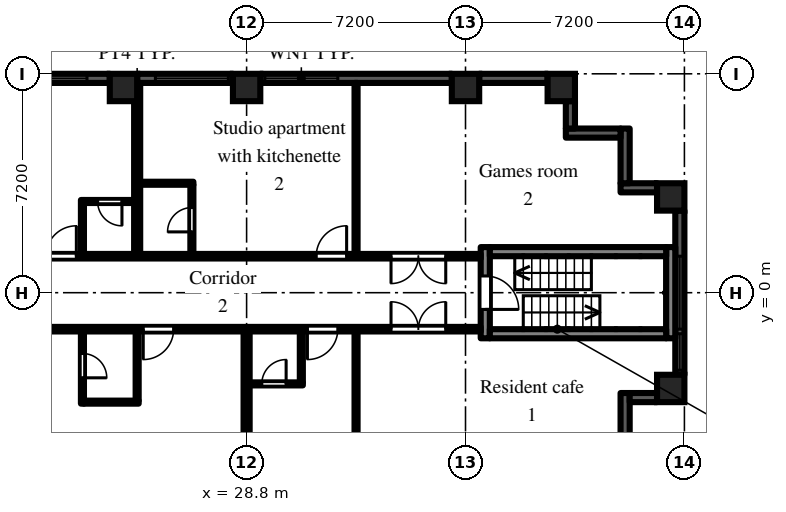
"""IFC4 building model, lengths in metres.
Left out: names, types, materials, properties, quantities, classifications, styles, units other than length and angle.
Written with IfcOpenShell. Run it as: python <this file> out.ifc"""

import sys

from ifc_helpers import new_model, si_unit, direction, frame, frame_2d, origin, origin_2d, place, context, subcontext, project, spatial, rectangle, extrude, element, fill, save


model = new_model("IFC4")
c1 = context("Model", 3, precision=1e-05, world=origin(), true_north=direction((0.0, 1.0)))
c2 = subcontext(c1, "Body", "Model", "MODEL_VIEW")
j1 = project(units=[si_unit("LENGTHUNIT", "METRE"), si_unit("PLANEANGLEUNIT", "RADIAN")], contexts=[c1])
p1 = place(None, origin())
s1 = spatial("IfcSite", under=j1, at=p1, CompositionType="ELEMENT")
p2 = place(p1, origin())
s2 = spatial("IfcBuilding", under=s1, at=p2, CompositionType="ELEMENT")
p3 = place(p2, frame((0.0, 0.0, 35.7)))
s3 = spatial("IfcBuildingStorey", under=s2, at=p3, CompositionType="ELEMENT", Elevation=35.7)
for number, where, z_axis, x_axis in (
    (1, (24.75, 6.75, 0.0), (0.0, 0.0, 1.0), (1.0, 0.0, 0.0)),
    (2, (28.8, 6.75, 0.0), (0.0, 0.0, 1.0), (1.0, 0.0, 0.0)),
    (3, (36.0, 6.75, 0.0), (0.0, 0.0, 1.0), (1.0, 0.0, 0.0)),
    (4, (39.15, 6.75, 0.0), (0.0, 0.0, 1.0), (1.0, 0.0, 0.0)),
    (5, (42.75, -3.15, 0.0), (0.0, 0.0, 1.0), (1.0, 0.0, 0.0)),
    (6, (42.75, 3.15, 0.0), (0.0, 0.0, 1.0), (1.0, 0.0, 0.0)),
):
    element("IfcColumn", number, at=place(p3, frame(where, z_axis=z_axis, x_axis=x_axis)), inside=s3, PredefinedType="COLUMN", context=c2, shape_type="SweptSolid", body=[
        extrude(rectangle(XDim=0.9, YDim=0.9, at=origin_2d()), origin(), (0.0, 0.0, 1.0), 3.0),
    ])
p4 = place(p3, frame((41.25, -5.1, 0.0), z_axis=(0.0, 0.0, 1.0), x_axis=(0.0, 1.0, 0.0)))
e7 = element("IfcWall", 7, at=p4, inside=s3, PredefinedType="SOLIDWALL", context=c2, shape_type="SweptSolid", body=[
    extrude(rectangle(XDim=1.8, YDim=0.3, at=frame_2d((0.9, 0.0))), origin(), (0.0, 0.0, 1.0), 2.575),
])
p5 = place(p3, frame((41.4, -3.45, 0.0), z_axis=(0.0, 0.0, 1.0), x_axis=(1.0, 0.0, 0.0)))
e8 = element("IfcWall", 8, at=p5, inside=s3, PredefinedType="SOLIDWALL", context=c2, shape_type="SweptSolid", body=[
    extrude(rectangle(XDim=0.9, YDim=0.3, at=frame_2d((0.45, 0.0))), origin(), (0.0, 0.0, 1.0), 2.575),
])
p6 = place(p3, frame((43.05, -2.7, 0.0), z_axis=(0.0, 0.0, 1.0), x_axis=(0.0, 1.0, 0.0)))
e9 = element("IfcWall", 9, at=p6, inside=s3, PredefinedType="SOLIDWALL", context=c2, shape_type="SweptSolid", body=[
    extrude(rectangle(XDim=5.4, YDim=0.3, at=frame_2d((2.7, 0.0))), origin(), (0.0, 0.0, 1.0), 2.1),
])
p7 = place(p6, frame((1.5, 0.0, 0.2)))
e10 = element("IfcOpeningElement", 10, at=p7, cuts=e9, PredefinedType="OPENING", context=c2, shape_type="SweptSolid", body=[
    extrude(rectangle(XDim=2.4, YDim=1.85, at=frame_2d((1.2, 0.925))), frame((0.0, 0.16, 0.0), z_axis=(0.0, -1.0, 0.0), x_axis=(1.0, 0.0, 0.0)), (0.0, 0.0, 1.0), 0.32),
])
p8 = place(p6, frame((0.15, 0.0, 0.2)))
e11 = element("IfcOpeningElement", 11, at=p8, cuts=e9, PredefinedType="OPENING", context=c2, shape_type="SweptSolid", body=[
    extrude(rectangle(XDim=1.2, YDim=1.85, at=frame_2d((0.6, 0.925))), frame((0.0, 0.16, 0.0), z_axis=(0.0, -1.0, 0.0), x_axis=(1.0, 0.0, 0.0)), (0.0, 0.0, 1.0), 0.32),
])
p9 = place(p3, frame((42.3, 3.45, 0.0), z_axis=(0.0, 0.0, 1.0), x_axis=(-1.0, 0.0, 0.0)))
e12 = element("IfcWall", 12, at=p9, inside=s3, PredefinedType="SOLIDWALL", context=c2, shape_type="SweptSolid", body=[
    extrude(rectangle(XDim=1.2, YDim=0.3, at=frame_2d((0.6, 0.0))), origin(), (0.0, 0.0, 1.0), 2.575),
])
p10 = place(p3, frame((41.25, 3.6, 0.0), z_axis=(0.0, 0.0, 1.0), x_axis=(0.0, 1.0, 0.0)))
e13 = element("IfcWall", 13, at=p10, inside=s3, PredefinedType="SOLIDWALL", context=c2, shape_type="SweptSolid", body=[
    extrude(rectangle(XDim=1.8, YDim=0.3, at=frame_2d((0.9, 0.0))), origin(), (0.0, 0.0, 1.0), 2.575),
])
p11 = place(p3, frame((41.1, 5.25, 0.0), z_axis=(0.0, 0.0, 1.0), x_axis=(-1.0, 0.0, 0.0)))
e14 = element("IfcWall", 14, at=p11, inside=s3, PredefinedType="SOLIDWALL", context=c2, shape_type="SweptSolid", body=[
    extrude(rectangle(XDim=1.8, YDim=0.3, at=frame_2d((0.9, 0.0))), origin(), (0.0, 0.0, 1.0), 2.575),
])
p12 = place(p3, frame((39.45, 5.4, 0.0), z_axis=(0.0, 0.0, 1.0), x_axis=(0.0, 1.0, 0.0)))
e15 = element("IfcWall", 15, at=p12, inside=s3, PredefinedType="SOLIDWALL", context=c2, shape_type="SweptSolid", body=[
    extrude(rectangle(XDim=0.9, YDim=0.3, at=frame_2d((0.45, 0.0))), origin(), (0.0, 0.0, 1.0), 2.575),
])
p13 = place(p3, frame((38.7, 7.05, 0.0), z_axis=(0.0, 0.0, 1.0), x_axis=(-1.0, 0.0, 0.0)))
e16 = element("IfcWall", 16, at=p13, inside=s3, PredefinedType="SOLIDWALL", context=c2, shape_type="SweptSolid", body=[
    extrude(rectangle(XDim=2.25, YDim=0.3, at=frame_2d((1.125, 0.0))), origin(), (0.0, 0.0, 1.0), 2.1),
])
p14 = place(p3, frame((35.55, 7.05, 0.0), z_axis=(0.0, 0.0, 1.0), x_axis=(-1.0, 0.0, 0.0)))
e17 = element("IfcWall", 17, at=p14, inside=s3, PredefinedType="SOLIDWALL", context=c2, shape_type="SweptSolid", body=[
    extrude(rectangle(XDim=6.3, YDim=0.3, at=frame_2d((3.15, 0.0))), origin(), (0.0, 0.0, 1.0), 2.1),
])
p15 = place(p14, frame((3.75, 0.0, 0.2)))
e18 = element("IfcOpeningElement", 18, at=p15, cuts=e17, PredefinedType="OPENING", context=c2, shape_type="SweptSolid", body=[
    extrude(rectangle(XDim=2.4, YDim=1.85, at=frame_2d((1.2, 0.925))), frame((0.0, 0.16, 0.0), z_axis=(0.0, -1.0, 0.0), x_axis=(1.0, 0.0, 0.0)), (0.0, 0.0, 1.0), 0.32),
])
p16 = place(p3, frame((28.35, 7.05, 0.0), z_axis=(0.0, 0.0, 1.0), x_axis=(-1.0, 0.0, 0.0)))
e19 = element("IfcWall", 19, at=p16, inside=s3, PredefinedType="SOLIDWALL", context=c2, shape_type="SweptSolid", body=[
    extrude(rectangle(XDim=3.15, YDim=0.3, at=frame_2d((1.575, 0.0))), origin(), (0.0, 0.0, 1.0), 2.1),
])
p17 = place(p16, frame((0.15, 0.0, 0.2)))
e20 = element("IfcOpeningElement", 20, at=p17, cuts=e19, PredefinedType="OPENING", context=c2, shape_type="SweptSolid", body=[
    extrude(rectangle(XDim=2.4, YDim=1.85, at=frame_2d((1.2, 0.925))), frame((0.0, 0.16, 0.0), z_axis=(0.0, -1.0, 0.0), x_axis=(1.0, 0.0, 0.0)), (0.0, 0.0, 1.0), 0.32),
])
p18 = place(p3, frame((24.3, 7.05, 0.0), z_axis=(0.0, 0.0, 1.0), x_axis=(-1.0, 0.0, 0.0)))
e21 = element("IfcWall", 21, at=p18, inside=s3, PredefinedType="SOLIDWALL", context=c2, shape_type="SweptSolid", body=[
    extrude(rectangle(XDim=2.7, YDim=0.3, at=frame_2d((1.35, 0.0))), origin(), (0.0, 0.0, 1.0), 2.1),
])
p19 = place(p18, frame((0.75, 0.0, 0.2)))
e22 = element("IfcOpeningElement", 22, at=p19, cuts=e21, PredefinedType="OPENING", context=c2, shape_type="SweptSolid", body=[
    extrude(rectangle(XDim=1.2, YDim=1.85, at=frame_2d((0.6, 0.925))), frame((0.0, 0.16, 0.0), z_axis=(0.0, -1.0, 0.0), x_axis=(1.0, 0.0, 0.0)), (0.0, 0.0, 1.0), 0.32),
])
p20 = place(p3, frame((36.65, -1.5, 0.0), z_axis=(0.0, 0.0, 1.0), x_axis=(0.0, 1.0, 0.0)))
e23 = element("IfcWall", 23, at=p20, inside=s3, PredefinedType="SHEAR", context=c2, shape_type="SweptSolid", body=[
    extrude(rectangle(XDim=3.0, YDim=0.3, at=frame_2d((1.5, 0.0))), origin(), (0.0, 0.0, 1.0), 2.575),
])
p21 = place(p20, frame((0.95, 0.0, 0.0)))
e24 = element("IfcOpeningElement", 24, at=p21, cuts=e23, PredefinedType="OPENING", context=c2, shape_type="SweptSolid", body=[
    extrude(rectangle(XDim=1.1, YDim=2.1, at=frame_2d((0.55, 1.05))), frame((0.0, 0.16, 0.0), z_axis=(0.0, -1.0, 0.0), x_axis=(1.0, 0.0, 0.0)), (0.0, 0.0, 1.0), 0.32),
])
p22 = place(p3, frame((42.75, -1.5, 0.0), z_axis=(0.0, 0.0, 1.0), x_axis=(0.0, 1.0, 0.0)))
e25 = element("IfcWall", 25, at=p22, inside=s3, PredefinedType="SHEAR", context=c2, shape_type="SweptSolid", body=[
    extrude(rectangle(XDim=3.0, YDim=0.3, at=frame_2d((1.5, 0.0))), origin(), (0.0, 0.0, 1.0), 2.575),
])
for number, where, z_axis, x_axis in (
    (26, (36.8, -1.35, 0.0), (0.0, 0.0, 1.0), (1.0, 0.0, 0.0)),
    (27, (36.8, 1.35, 0.0), (0.0, 0.0, 1.0), (1.0, 0.0, 0.0)),
):
    element("IfcWall", number, at=place(p3, frame(where, z_axis=z_axis, x_axis=x_axis)), inside=s3, PredefinedType="SHEAR", context=c2, shape_type="SweptSolid", body=[
        extrude(rectangle(XDim=5.8, YDim=0.3, at=frame_2d((2.9, 0.0))), origin(), (0.0, 0.0, 1.0), 2.575),
    ])
p23 = place(p3, frame((21.6, -1.2, 0.0), z_axis=(0.0, 0.0, 1.0), x_axis=(1.0, 0.0, 0.0)))
e28 = element("IfcWall", 28, at=p23, inside=s3, PredefinedType="PARTITIONING", context=c2, shape_type="SweptSolid", body=[
    extrude(rectangle(XDim=14.9, YDim=0.15, at=frame_2d((7.45, 0.0))), origin(), (0.0, 0.0, 1.0), 2.575),
])
p24 = place(p23, frame((3.8, 0.0, 0.0)))
e29 = element("IfcOpeningElement", 29, at=p24, cuts=e28, PredefinedType="OPENING", context=c2, shape_type="SweptSolid", body=[
    extrude(rectangle(XDim=1.0, YDim=2.1, at=frame_2d((0.5, 1.05))), frame((0.0, 0.085, 0.0), z_axis=(0.0, -1.0, 0.0), x_axis=(1.0, 0.0, 0.0)), (0.0, 0.0, 1.0), 0.17),
])
p25 = place(p23, frame((9.2, 0.0, 0.0)))
e30 = element("IfcOpeningElement", 30, at=p25, cuts=e28, PredefinedType="OPENING", context=c2, shape_type="SweptSolid", body=[
    extrude(rectangle(XDim=1.0, YDim=2.1, at=frame_2d((0.5, 1.05))), frame((0.0, 0.085, 0.0), z_axis=(0.0, -1.0, 0.0), x_axis=(1.0, 0.0, 0.0)), (0.0, 0.0, 1.0), 0.17),
])
p26 = place(p23, frame((11.95, 0.0, 0.0)))
e31 = element("IfcOpeningElement", 31, at=p26, cuts=e28, PredefinedType="OPENING", context=c2, shape_type="SweptSolid", body=[
    extrude(rectangle(XDim=1.8, YDim=2.1, at=frame_2d((0.9, 1.05))), frame((0.0, 0.085, 0.0), z_axis=(0.0, -1.0, 0.0), x_axis=(1.0, 0.0, 0.0)), (0.0, 0.0, 1.0), 0.17),
])
p27 = place(p3, frame((21.6, 1.2, 0.0), z_axis=(0.0, 0.0, 1.0), x_axis=(1.0, 0.0, 0.0)))
e32 = element("IfcWall", 32, at=p27, inside=s3, PredefinedType="PARTITIONING", context=c2, shape_type="SweptSolid", body=[
    extrude(rectangle(XDim=14.9, YDim=0.15, at=frame_2d((7.45, 0.0))), origin(), (0.0, 0.0, 1.0), 2.575),
])
p28 = place(p27, frame((0.6, 0.0, 0.0)))
e33 = element("IfcOpeningElement", 33, at=p28, cuts=e32, PredefinedType="OPENING", context=c2, shape_type="SweptSolid", body=[
    extrude(rectangle(XDim=1.0, YDim=2.1, at=frame_2d((0.5, 1.05))), frame((0.0, 0.085, 0.0), z_axis=(0.0, -1.0, 0.0), x_axis=(1.0, 0.0, 0.0)), (0.0, 0.0, 1.0), 0.17),
])
p29 = place(p27, frame((9.49, 0.0, 0.0)))
e34 = element("IfcOpeningElement", 34, at=p29, cuts=e32, PredefinedType="OPENING", context=c2, shape_type="SweptSolid", body=[
    extrude(rectangle(XDim=1.0, YDim=2.1, at=frame_2d((0.5, 1.05))), frame((0.0, 0.085, 0.0), z_axis=(0.0, -1.0, 0.0), x_axis=(1.0, 0.0, 0.0)), (0.0, 0.0, 1.0), 0.17),
])
p30 = place(p27, frame((11.95, 0.0, 0.0)))
e35 = element("IfcOpeningElement", 35, at=p30, cuts=e32, PredefinedType="OPENING", context=c2, shape_type="SweptSolid", body=[
    extrude(rectangle(XDim=1.8, YDim=2.1, at=frame_2d((0.9, 1.05))), frame((0.0, 0.085, 0.0), z_axis=(0.0, -1.0, 0.0), x_axis=(1.0, 0.0, 0.0)), (0.0, 0.0, 1.0), 0.17),
])
p31 = place(p3, frame((23.4, -3.65, 0.0), z_axis=(0.0, 0.0, 1.0), x_axis=(0.0, 1.0, 0.0)))
e36 = element("IfcWall", 36, at=p31, inside=s3, PredefinedType="PARTITIONING", context=c2, shape_type="SweptSolid", body=[
    extrude(rectangle(XDim=2.375, YDim=0.1, at=frame_2d((1.188, 0.0))), origin(), (0.0, 0.0, 1.0), 2.575),
])
p32 = place(p31, frame((0.85, 0.0, 0.0)))
e37 = element("IfcOpeningElement", 37, at=p32, cuts=e36, PredefinedType="OPENING", context=c2, shape_type="SweptSolid", body=[
    extrude(rectangle(XDim=0.8, YDim=2.1, at=frame_2d((0.4, 1.05))), frame((0.0, 0.06, 0.0), z_axis=(0.0, -1.0, 0.0), x_axis=(1.0, 0.0, 0.0)), (0.0, 0.0, 1.0), 0.12),
])
p33 = place(p3, frame((23.45, -3.6, 0.0), z_axis=(0.0, 0.0, 1.0), x_axis=(1.0, 0.0, 0.0)))
e38 = element("IfcWall", 38, at=p33, inside=s3, PredefinedType="PARTITIONING", context=c2, shape_type="SweptSolid", body=[
    extrude(rectangle(XDim=1.8, YDim=0.1, at=frame_2d((0.9, 0.0))), origin(), (0.0, 0.0, 1.0), 2.575),
])
p34 = place(p3, frame((23.4, 1.275, 0.0), z_axis=(0.0, 0.0, 1.0), x_axis=(0.0, 1.0, 0.0)))
e39 = element("IfcWall", 39, at=p34, inside=s3, PredefinedType="PARTITIONING", context=c2, shape_type="SweptSolid", body=[
    extrude(rectangle(XDim=1.775, YDim=0.1, at=frame_2d((0.888, 0.0))), origin(), (0.0, 0.0, 1.0), 2.575),
])
p35 = place(p3, frame((23.45, 3.0, 0.0), z_axis=(0.0, 0.0, 1.0), x_axis=(1.0, 0.0, 0.0)))
e40 = element("IfcWall", 40, at=p35, inside=s3, PredefinedType="PARTITIONING", context=c2, shape_type="SweptSolid", body=[
    extrude(rectangle(XDim=1.65, YDim=0.1, at=frame_2d((0.825, 0.0))), origin(), (0.0, 0.0, 1.0), 2.575),
])
p36 = place(p35, frame((0.45, 0.0, 0.0)))
e41 = element("IfcOpeningElement", 41, at=p36, cuts=e40, PredefinedType="OPENING", context=c2, shape_type="SweptSolid", body=[
    extrude(rectangle(XDim=0.8, YDim=2.1, at=frame_2d((0.4, 1.05))), frame((0.0, 0.06, 0.0), z_axis=(0.0, -1.0, 0.0), x_axis=(1.0, 0.0, 0.0)), (0.0, 0.0, 1.0), 0.12),
])
p37 = place(p3, frame((25.2, -3.55, 0.0), z_axis=(0.0, 0.0, 1.0), x_axis=(0.0, 1.0, 0.0)))
e42 = element("IfcWall", 42, at=p37, inside=s3, PredefinedType="PARTITIONING", context=c2, shape_type="SweptSolid", body=[
    extrude(rectangle(XDim=2.275, YDim=0.1, at=frame_2d((1.138, 0.0))), origin(), (0.0, 0.0, 1.0), 2.575),
])
p38 = place(p3, frame((25.2, 1.275, 0.0), z_axis=(0.0, 0.0, 1.0), x_axis=(0.0, 1.0, 0.0)))
e43 = element("IfcWall", 43, at=p38, inside=s3, PredefinedType="PARTITIONING", context=c2, shape_type="SweptSolid", body=[
    extrude(rectangle(XDim=5.625, YDim=0.2, at=frame_2d((2.812, 0.0))), origin(), (0.0, 0.0, 1.0), 2.575),
])
p39 = place(p3, frame((25.3, 3.6, 0.0), z_axis=(0.0, 0.0, 1.0), x_axis=(1.0, 0.0, 0.0)))
e44 = element("IfcWall", 44, at=p39, inside=s3, PredefinedType="PARTITIONING", context=c2, shape_type="SweptSolid", body=[
    extrude(rectangle(XDim=1.75, YDim=0.1, at=frame_2d((0.875, 0.0))), origin(), (0.0, 0.0, 1.0), 2.575),
])
p40 = place(p3, frame((27.0, 1.275, 0.0), z_axis=(0.0, 0.0, 1.0), x_axis=(0.0, 1.0, 0.0)))
e45 = element("IfcWall", 45, at=p40, inside=s3, PredefinedType="PARTITIONING", context=c2, shape_type="SweptSolid", body=[
    extrude(rectangle(XDim=2.275, YDim=0.1, at=frame_2d((1.138, 0.0))), origin(), (0.0, 0.0, 1.0), 2.575),
])
p41 = place(p40, frame((0.725, 0.0, 0.0)))
e46 = element("IfcOpeningElement", 46, at=p41, cuts=e45, PredefinedType="OPENING", context=c2, shape_type="SweptSolid", body=[
    extrude(rectangle(XDim=0.8, YDim=2.1, at=frame_2d((0.4, 1.05))), frame((0.0, 0.06, 0.0), z_axis=(0.0, -1.0, 0.0), x_axis=(1.0, 0.0, 0.0)), (0.0, 0.0, 1.0), 0.12),
])
p42 = place(p3, frame((28.8, -6.9, 0.0), z_axis=(0.0, 0.0, 1.0), x_axis=(0.0, 1.0, 0.0)))
e47 = element("IfcWall", 47, at=p42, inside=s3, PredefinedType="PARTITIONING", context=c2, shape_type="SweptSolid", body=[
    extrude(rectangle(XDim=5.625, YDim=0.2, at=frame_2d((2.812, 0.0))), origin(), (0.0, 0.0, 1.0), 2.575),
])
p43 = place(p3, frame((28.9, -3.0, 0.0), z_axis=(0.0, 0.0, 1.0), x_axis=(1.0, 0.0, 0.0)))
e48 = element("IfcWall", 48, at=p43, inside=s3, PredefinedType="PARTITIONING", context=c2, shape_type="SweptSolid", body=[
    extrude(rectangle(XDim=1.75, YDim=0.1, at=frame_2d((0.875, 0.0))), origin(), (0.0, 0.0, 1.0), 2.575),
])
p44 = place(p43, frame((0.4, 0.0, 0.0)))
e49 = element("IfcOpeningElement", 49, at=p44, cuts=e48, PredefinedType="OPENING", context=c2, shape_type="SweptSolid", body=[
    extrude(rectangle(XDim=0.8, YDim=2.1, at=frame_2d((0.4, 1.05))), frame((0.0, 0.06, 0.0), z_axis=(0.0, -1.0, 0.0), x_axis=(1.0, 0.0, 0.0)), (0.0, 0.0, 1.0), 0.12),
])
p45 = place(p3, frame((30.6, -2.95, 0.0), z_axis=(0.0, 0.0, 1.0), x_axis=(0.0, 1.0, 0.0)))
e50 = element("IfcWall", 50, at=p45, inside=s3, PredefinedType="PARTITIONING", context=c2, shape_type="SweptSolid", body=[
    extrude(rectangle(XDim=1.675, YDim=0.1, at=frame_2d((0.837, 0.0))), origin(), (0.0, 0.0, 1.0), 2.575),
])
for number, where, z_axis, x_axis in (
    (51, (32.4, -6.9, 0.0), (0.0, 0.0, 1.0), (0.0, 1.0, 0.0)),
    (52, (32.4, 1.275, 0.0), (0.0, 0.0, 1.0), (0.0, 1.0, 0.0)),
):
    element("IfcWall", number, at=place(p3, frame(where, z_axis=z_axis, x_axis=x_axis)), inside=s3, PredefinedType="PARTITIONING", context=c2, shape_type="SweptSolid", body=[
        extrude(rectangle(XDim=5.625, YDim=0.1, at=frame_2d((2.812, 0.0))), origin(), (0.0, 0.0, 1.0), 2.575),
    ])
p46 = place(p7, origin())
e53 = element("IfcWindow", 53, at=p46, inside=s3, PartitioningType="SINGLE_PANEL", PredefinedType="WINDOW", context=c2, shape_type="SweptSolid", body=[
    extrude(rectangle(XDim=2.4, YDim=1.85, at=frame_2d((1.2, 0.925))), frame((0.0, 0.03, 0.0), z_axis=(0.0, -1.0, 0.0), x_axis=(1.0, 0.0, 0.0)), (0.0, 0.0, 1.0), 0.06),
])
fill(e10, e53)
p47 = place(p8, origin())
e54 = element("IfcWindow", 54, at=p47, inside=s3, PartitioningType="SINGLE_PANEL", PredefinedType="WINDOW", context=c2, shape_type="SweptSolid", body=[
    extrude(rectangle(XDim=1.2, YDim=1.85, at=frame_2d((0.6, 0.925))), frame((0.0, 0.03, 0.0), z_axis=(0.0, -1.0, 0.0), x_axis=(1.0, 0.0, 0.0)), (0.0, 0.0, 1.0), 0.06),
])
fill(e11, e54)
p48 = place(p15, origin())
e55 = element("IfcWindow", 55, at=p48, inside=s3, PartitioningType="SINGLE_PANEL", PredefinedType="WINDOW", context=c2, shape_type="SweptSolid", body=[
    extrude(rectangle(XDim=2.4, YDim=1.85, at=frame_2d((1.2, 0.925))), frame((0.0, 0.03, 0.0), z_axis=(0.0, -1.0, 0.0), x_axis=(1.0, 0.0, 0.0)), (0.0, 0.0, 1.0), 0.06),
])
fill(e18, e55)
p49 = place(p17, origin())
e56 = element("IfcWindow", 56, at=p49, inside=s3, PartitioningType="SINGLE_PANEL", PredefinedType="WINDOW", context=c2, shape_type="SweptSolid", body=[
    extrude(rectangle(XDim=2.4, YDim=1.85, at=frame_2d((1.2, 0.925))), frame((0.0, 0.03, 0.0), z_axis=(0.0, -1.0, 0.0), x_axis=(1.0, 0.0, 0.0)), (0.0, 0.0, 1.0), 0.06),
])
fill(e20, e56)
p50 = place(p19, origin())
e57 = element("IfcWindow", 57, at=p50, inside=s3, PartitioningType="SINGLE_PANEL", PredefinedType="WINDOW", context=c2, shape_type="SweptSolid", body=[
    extrude(rectangle(XDim=1.2, YDim=1.85, at=frame_2d((0.6, 0.925))), frame((0.0, 0.03, 0.0), z_axis=(0.0, -1.0, 0.0), x_axis=(1.0, 0.0, 0.0)), (0.0, 0.0, 1.0), 0.06),
])
fill(e22, e57)
p51 = place(p21, frame((1.1, 0.0, 0.0), z_axis=(0.0, 0.0, 1.0), x_axis=(-1.0, 0.0, 0.0)))
e58 = element("IfcDoor", 58, at=p51, inside=s3, OperationType="SINGLE_SWING_RIGHT", PredefinedType="DOOR", context=c2, shape_type="SweptSolid", body=[
    extrude(rectangle(XDim=1.1, YDim=2.1, at=frame_2d((0.55, 1.05))), frame((0.0, 0.025, 0.0), z_axis=(0.0, -1.0, 0.0), x_axis=(1.0, 0.0, 0.0)), (0.0, 0.0, 1.0), 0.05),
])
fill(e24, e58)
p52 = place(p36, frame((0.8, 0.0, 0.0), z_axis=(0.0, 0.0, 1.0), x_axis=(-1.0, 0.0, 0.0)))
e59 = element("IfcDoor", 59, at=p52, inside=s3, OperationType="SINGLE_SWING_LEFT", PredefinedType="DOOR", context=c2, shape_type="SweptSolid", body=[
    extrude(rectangle(XDim=0.8, YDim=2.1, at=frame_2d((0.4, 1.05))), frame((0.0, 0.025, 0.0), z_axis=(0.0, -1.0, 0.0), x_axis=(1.0, 0.0, 0.0)), (0.0, 0.0, 1.0), 0.05),
])
fill(e41, e59)
p53 = place(p28, origin())
e60 = element("IfcDoor", 60, at=p53, inside=s3, OperationType="SINGLE_SWING_RIGHT", PredefinedType="DOOR", context=c2, shape_type="SweptSolid", body=[
    extrude(rectangle(XDim=1.0, YDim=2.1, at=frame_2d((0.5, 1.05))), frame((0.0, 0.025, 0.0), z_axis=(0.0, -1.0, 0.0), x_axis=(1.0, 0.0, 0.0)), (0.0, 0.0, 1.0), 0.05),
])
fill(e33, e60)
p54 = place(p41, origin())
e61 = element("IfcDoor", 61, at=p54, inside=s3, OperationType="SINGLE_SWING_LEFT", PredefinedType="DOOR", context=c2, shape_type="SweptSolid", body=[
    extrude(rectangle(XDim=0.8, YDim=2.1, at=frame_2d((0.4, 1.05))), frame((0.0, 0.025, 0.0), z_axis=(0.0, -1.0, 0.0), x_axis=(1.0, 0.0, 0.0)), (0.0, 0.0, 1.0), 0.05),
])
fill(e46, e61)
p55 = place(p29, origin())
e62 = element("IfcDoor", 62, at=p55, inside=s3, OperationType="SINGLE_SWING_RIGHT", PredefinedType="DOOR", context=c2, shape_type="SweptSolid", body=[
    extrude(rectangle(XDim=1.0, YDim=2.1, at=frame_2d((0.5, 1.05))), frame((0.0, 0.025, 0.0), z_axis=(0.0, -1.0, 0.0), x_axis=(1.0, 0.0, 0.0)), (0.0, 0.0, 1.0), 0.05),
])
fill(e34, e62)
p56 = place(p30, frame((1.8, 0.0, 0.0), z_axis=(0.0, 0.0, 1.0), x_axis=(-1.0, 0.0, 0.0)))
e63 = element("IfcDoor", 63, at=p56, inside=s3, OperationType="DOUBLE_DOOR_DOUBLE_SWING", PredefinedType="DOOR", context=c2, shape_type="SweptSolid", body=[
    extrude(rectangle(XDim=1.8, YDim=2.1, at=frame_2d((0.9, 1.05))), frame((0.0, 0.025, 0.0), z_axis=(0.0, -1.0, 0.0), x_axis=(1.0, 0.0, 0.0)), (0.0, 0.0, 1.0), 0.05),
])
fill(e35, e63)
p57 = place(p32, frame((0.8, 0.0, 0.0), z_axis=(0.0, 0.0, 1.0), x_axis=(-1.0, 0.0, 0.0)))
e64 = element("IfcDoor", 64, at=p57, inside=s3, OperationType="SINGLE_SWING_RIGHT", PredefinedType="DOOR", context=c2, shape_type="SweptSolid", body=[
    extrude(rectangle(XDim=0.8, YDim=2.1, at=frame_2d((0.4, 1.05))), frame((0.0, 0.025, 0.0), z_axis=(0.0, -1.0, 0.0), x_axis=(1.0, 0.0, 0.0)), (0.0, 0.0, 1.0), 0.05),
])
fill(e37, e64)
p58 = place(p24, frame((1.0, 0.0, 0.0), z_axis=(0.0, 0.0, 1.0), x_axis=(-1.0, 0.0, 0.0)))
e65 = element("IfcDoor", 65, at=p58, inside=s3, OperationType="SINGLE_SWING_RIGHT", PredefinedType="DOOR", context=c2, shape_type="SweptSolid", body=[
    extrude(rectangle(XDim=1.0, YDim=2.1, at=frame_2d((0.5, 1.05))), frame((0.0, 0.025, 0.0), z_axis=(0.0, -1.0, 0.0), x_axis=(1.0, 0.0, 0.0)), (0.0, 0.0, 1.0), 0.05),
])
fill(e29, e65)
p59 = place(p44, origin())
e66 = element("IfcDoor", 66, at=p59, inside=s3, OperationType="SINGLE_SWING_RIGHT", PredefinedType="DOOR", context=c2, shape_type="SweptSolid", body=[
    extrude(rectangle(XDim=0.8, YDim=2.1, at=frame_2d((0.4, 1.05))), frame((0.0, 0.025, 0.0), z_axis=(0.0, -1.0, 0.0), x_axis=(1.0, 0.0, 0.0)), (0.0, 0.0, 1.0), 0.05),
])
fill(e49, e66)
p60 = place(p25, frame((1.0, 0.0, 0.0), z_axis=(0.0, 0.0, 1.0), x_axis=(-1.0, 0.0, 0.0)))
e67 = element("IfcDoor", 67, at=p60, inside=s3, OperationType="SINGLE_SWING_RIGHT", PredefinedType="DOOR", context=c2, shape_type="SweptSolid", body=[
    extrude(rectangle(XDim=1.0, YDim=2.1, at=frame_2d((0.5, 1.05))), frame((0.0, 0.025, 0.0), z_axis=(0.0, -1.0, 0.0), x_axis=(1.0, 0.0, 0.0)), (0.0, 0.0, 1.0), 0.05),
])
fill(e30, e67)
p61 = place(p26, origin())
e68 = element("IfcDoor", 68, at=p61, inside=s3, OperationType="DOUBLE_DOOR_DOUBLE_SWING", PredefinedType="DOOR", context=c2, shape_type="SweptSolid", body=[
    extrude(rectangle(XDim=1.8, YDim=2.1, at=frame_2d((0.9, 1.05))), frame((0.0, 0.025, 0.0), z_axis=(0.0, -1.0, 0.0), x_axis=(1.0, 0.0, 0.0)), (0.0, 0.0, 1.0), 0.05),
])
fill(e31, e68)
save(model, sys.argv[1])
